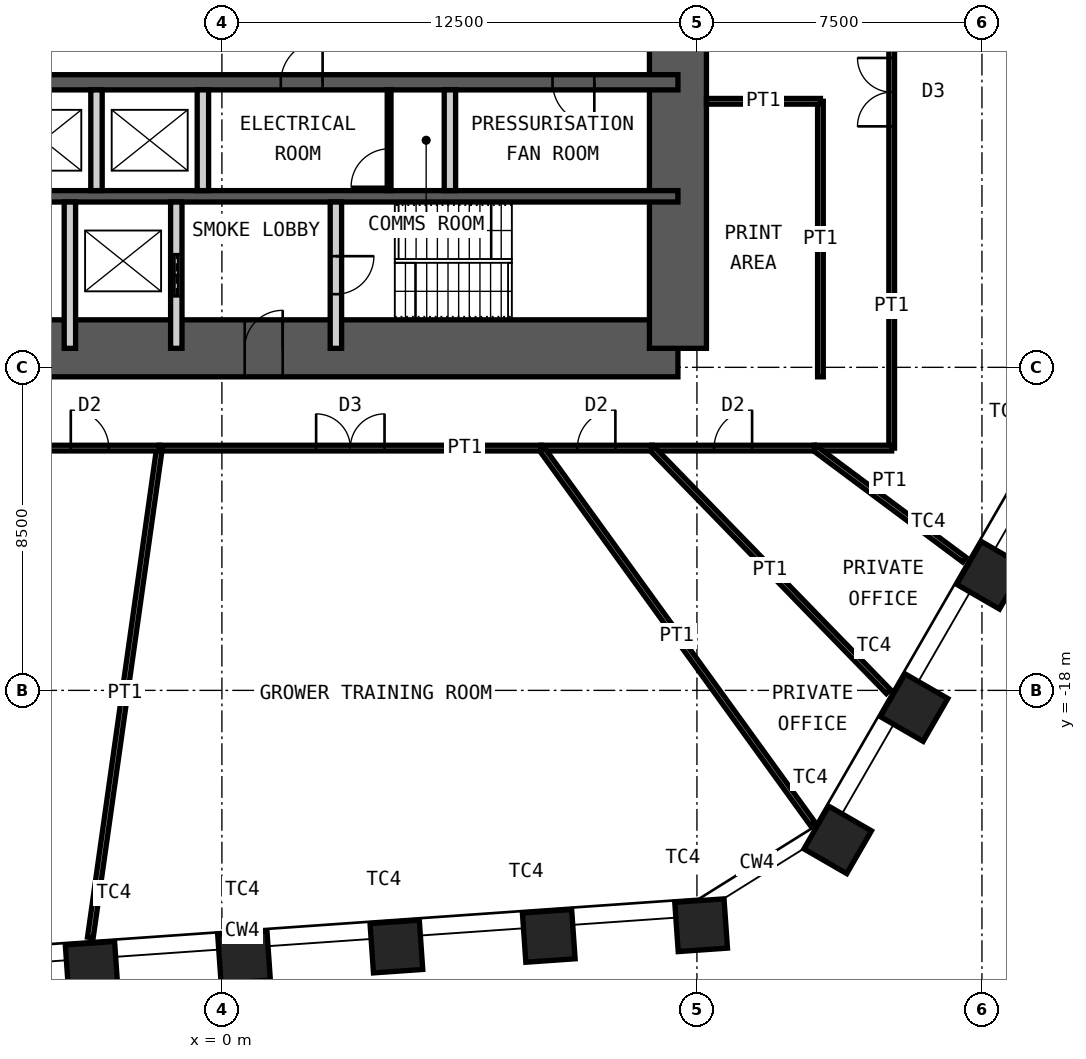
"""IFC4 building model, lengths in metres.
Left out: names, types, materials, properties, quantities, classifications, styles, units other than length and angle.
Written with IfcOpenShell. Run it as: python <this file> out.ifc"""

import sys

from ifc_helpers import new_model, si_unit, direction, frame, frame_2d, origin, origin_2d, place, context, subcontext, project, spatial, rectangle, hollow_rectangle, extrude, element, fill, save


model = new_model("IFC4")
c1 = context("Model", 3, precision=1e-05, world=origin(), true_north=direction((0.0, 1.0)))
c2 = subcontext(c1, "Body", "Model", "MODEL_VIEW")
j1 = project(units=[si_unit("LENGTHUNIT", "METRE"), si_unit("PLANEANGLEUNIT", "RADIAN")], contexts=[c1])
p1 = place(None, origin())
s1 = spatial("IfcSite", under=j1, at=p1, CompositionType="ELEMENT")
p2 = place(p1, origin())
s2 = spatial("IfcBuilding", under=s1, at=p2, CompositionType="ELEMENT")
p3 = place(p2, frame((0.0, 0.0, 166.0)))
s3 = spatial("IfcBuildingStorey", under=s2, at=p3, CompositionType="ELEMENT", Elevation=166.0)
for number, where, z_axis, x_axis in (
    (1, (20.223, -14.972, 0.0), (0.0, 0.0, 1.0), (0.5, 0.866, 0.0)),
    (2, (18.214, -18.453, 0.0), (0.0, 0.0, 1.0), (0.5, 0.866, 0.0)),
    (3, (16.204, -21.933, 0.0), (0.0, 0.0, 1.0), (0.5, 0.866, 0.0)),
    (4, (12.61, -24.179, 0.0), (0.0, 0.0, 1.0), (0.998, 0.07, 0.0)),
    (5, (8.601, -24.46, 0.0), (0.0, 0.0, 1.0), (0.998, 0.07, 0.0)),
    (6, (4.592, -24.74, 0.0), (0.0, 0.0, 1.0), (0.998, 0.07, 0.0)),
    (7, (0.582, -25.02, 0.0), (0.0, 0.0, 1.0), (0.998, 0.07, 0.0)),
    (8, (-3.427, -25.301, 0.0), (0.0, 0.0, 1.0), (0.998, 0.07, 0.0)),
):
    element("IfcColumn", number, at=place(p3, frame(where, z_axis=z_axis, x_axis=x_axis)), inside=s3, PredefinedType="COLUMN", context=c2, shape_type="SweptSolid", body=[
        extrude(hollow_rectangle(XDim=1.3, YDim=1.3, WallThickness=0.1, at=origin_2d()), origin(), (0.0, 0.0, 1.0), 4.2),
    ])
p4 = place(p3, frame((-12.0, -9.0, 0.0), z_axis=(0.0, 0.0, 1.0), x_axis=(1.0, 0.0, 0.0)))
e9 = element("IfcWall", 9, at=p4, inside=s3, PredefinedType="SHEAR", context=c2, shape_type="SweptSolid", body=[
    extrude(rectangle(XDim=24.0, YDim=1.5, at=frame_2d((12.0, 0.0))), origin(), (0.0, 0.0, 1.0), 4.2),
])
p5 = place(p4, frame((1.35, 0.0, 0.0)))
e10 = element("IfcOpeningElement", 10, at=p5, cuts=e9, PredefinedType="OPENING", context=c2, shape_type="SweptSolid", body=[
    extrude(rectangle(XDim=1.0, YDim=2.1, at=frame_2d((0.5, 1.05))), frame((0.0, 0.76, 0.0), z_axis=(0.0, -1.0, 0.0), x_axis=(1.0, 0.0, 0.0)), (0.0, 0.0, 1.0), 1.52),
])
p6 = place(p4, frame((5.325, 0.0, 0.0)))
e11 = element("IfcOpeningElement", 11, at=p6, cuts=e9, PredefinedType="OPENING", context=c2, shape_type="SweptSolid", body=[
    extrude(rectangle(XDim=1.15, YDim=2.1, at=frame_2d((0.575, 1.05))), frame((0.0, 0.76, 0.0), z_axis=(0.0, -1.0, 0.0), x_axis=(1.0, 0.0, 0.0)), (0.0, 0.0, 1.0), 1.52),
])
p7 = place(p4, frame((12.6, 0.0, 0.0)))
e12 = element("IfcOpeningElement", 12, at=p7, cuts=e9, PredefinedType="OPENING", context=c2, shape_type="SweptSolid", body=[
    extrude(rectangle(XDim=1.0, YDim=2.1, at=frame_2d((0.5, 1.05))), frame((0.0, 0.76, 0.0), z_axis=(0.0, -1.0, 0.0), x_axis=(1.0, 0.0, 0.0)), (0.0, 0.0, 1.0), 1.52),
])
p8 = place(p3, frame((12.0, -9.0, 0.0), z_axis=(0.0, 0.0, 1.0), x_axis=(0.0, 1.0, 0.0)))
e13 = element("IfcWall", 13, at=p8, inside=s3, PredefinedType="SHEAR", context=c2, shape_type="SweptSolid", body=[
    extrude(rectangle(XDim=18.0, YDim=1.5, at=frame_2d((9.0, 0.0))), origin(), (0.0, 0.0, 1.0), 4.2),
])
p9 = place(p8, frame((8.1, 0.0, 0.0)))
e14 = element("IfcOpeningElement", 14, at=p9, cuts=e13, PredefinedType="OPENING", context=c2, shape_type="SweptSolid", body=[
    extrude(rectangle(XDim=1.8, YDim=2.1, at=frame_2d((0.9, 1.05))), frame((0.0, 0.76, 0.0), z_axis=(0.0, -1.0, 0.0), x_axis=(1.0, 0.0, 0.0)), (0.0, 0.0, 1.0), 1.52),
])
p10 = place(p3, frame((-12.0, -2.0, 0.0), z_axis=(0.0, 0.0, 1.0), x_axis=(1.0, 0.0, 0.0)))
e15 = element("IfcWall", 15, at=p10, inside=s3, PredefinedType="SHEAR", context=c2, shape_type="SweptSolid", body=[
    extrude(rectangle(XDim=24.0, YDim=0.4, at=frame_2d((12.0, 0.0))), origin(), (0.0, 0.0, 1.0), 4.2),
])
p11 = place(p10, frame((1.1, 0.0, 0.0)))
e16 = element("IfcOpeningElement", 16, at=p11, cuts=e15, PredefinedType="OPENING", context=c2, shape_type="SweptSolid", body=[
    extrude(rectangle(XDim=1.1, YDim=2.1, at=frame_2d((0.55, 1.05))), frame((0.0, 0.21, 0.0), z_axis=(0.0, -1.0, 0.0), x_axis=(1.0, 0.0, 0.0)), (0.0, 0.0, 1.0), 0.42),
])
p12 = place(p10, frame((13.55, 0.0, 0.0)))
e17 = element("IfcOpeningElement", 17, at=p12, cuts=e15, PredefinedType="OPENING", context=c2, shape_type="SweptSolid", body=[
    extrude(rectangle(XDim=1.1, YDim=2.1, at=frame_2d((0.55, 1.05))), frame((0.0, 0.21, 0.0), z_axis=(0.0, -1.0, 0.0), x_axis=(1.0, 0.0, 0.0)), (0.0, 0.0, 1.0), 0.42),
])
p13 = place(p10, frame((20.7, 0.0, 0.0)))
e18 = element("IfcOpeningElement", 18, at=p13, cuts=e15, PredefinedType="OPENING", context=c2, shape_type="SweptSolid", body=[
    extrude(rectangle(XDim=1.1, YDim=2.1, at=frame_2d((0.55, 1.05))), frame((0.0, 0.21, 0.0), z_axis=(0.0, -1.0, 0.0), x_axis=(1.0, 0.0, 0.0)), (0.0, 0.0, 1.0), 0.42),
])
p14 = place(p10, frame((4.0, 0.0, 0.0)))
e19 = element("IfcOpeningElement", 19, at=p14, cuts=e15, PredefinedType="OPENING", context=c2, shape_type="SweptSolid", body=[
    extrude(rectangle(XDim=1.0, YDim=2.1, at=frame_2d((0.5, 1.05))), frame((0.0, 0.21, 0.0), z_axis=(0.0, -1.0, 0.0), x_axis=(1.0, 0.0, 0.0)), (0.0, 0.0, 1.0), 0.42),
])
p15 = place(p3, frame((-12.0, -5.0, 0.0), z_axis=(0.0, 0.0, 1.0), x_axis=(1.0, 0.0, 0.0)))
e20 = element("IfcWall", 20, at=p15, inside=s3, PredefinedType="SHEAR", context=c2, shape_type="SweptSolid", body=[
    extrude(rectangle(XDim=24.0, YDim=0.3, at=frame_2d((12.0, 0.0))), origin(), (0.0, 0.0, 1.0), 4.2),
])
for number, where, z_axis, x_axis in (
    (21, (-3.3, -4.85, 0.0), (0.0, 0.0, 1.0), (0.0, 1.0, 0.0)),
    (22, (-0.5, -4.85, 0.0), (0.0, 0.0, 1.0), (0.0, 1.0, 0.0)),
    (23, (6.0, -4.85, 0.0), (0.0, 0.0, 1.0), (0.0, 1.0, 0.0)),
):
    element("IfcWall", number, at=place(p3, frame(where, z_axis=z_axis, x_axis=x_axis)), inside=s3, PredefinedType="PARTITIONING", context=c2, shape_type="SweptSolid", body=[
        extrude(rectangle(XDim=2.65, YDim=0.3, at=frame_2d((1.325, 0.0))), origin(), (0.0, 0.0, 1.0), 3.98),
    ])
p16 = place(p3, frame((-4.0, -9.0, 0.0), z_axis=(0.0, 0.0, 1.0), x_axis=(0.0, 1.0, 0.0)))
e24 = element("IfcWall", 24, at=p16, inside=s3, PredefinedType="PARTITIONING", context=c2, shape_type="SweptSolid", body=[
    extrude(rectangle(XDim=3.85, YDim=0.3, at=frame_2d((1.925, 0.0))), origin(), (0.0, 0.0, 1.0), 3.98),
])
p17 = place(p3, frame((-1.2, -9.0, 0.0), z_axis=(0.0, 0.0, 1.0), x_axis=(0.0, 1.0, 0.0)))
e25 = element("IfcWall", 25, at=p17, inside=s3, PredefinedType="PARTITIONING", context=c2, shape_type="SweptSolid", body=[
    extrude(rectangle(XDim=3.85, YDim=0.3, at=frame_2d((1.925, 0.0))), origin(), (0.0, 0.0, 1.0), 3.98),
])
p18 = place(p17, frame((1.375, 0.0, 0.0)))
e26 = element("IfcOpeningElement", 26, at=p18, cuts=e25, PredefinedType="OPENING", context=c2, shape_type="SweptSolid", body=[
    extrude(rectangle(XDim=1.1, YDim=2.4, at=frame_2d((0.55, 1.2))), frame((0.0, 0.16, 0.0), z_axis=(0.0, -1.0, 0.0), x_axis=(1.0, 0.0, 0.0)), (0.0, 0.0, 1.0), 0.32),
])
p19 = place(p3, frame((3.0, -9.0, 0.0), z_axis=(0.0, 0.0, 1.0), x_axis=(0.0, 1.0, 0.0)))
e27 = element("IfcWall", 27, at=p19, inside=s3, PredefinedType="PARTITIONING", context=c2, shape_type="SweptSolid", body=[
    extrude(rectangle(XDim=3.85, YDim=0.3, at=frame_2d((1.925, 0.0))), origin(), (0.0, 0.0, 1.0), 3.98),
])
p20 = place(p19, frame((1.425, 0.0, 0.0)))
e28 = element("IfcOpeningElement", 28, at=p20, cuts=e27, PredefinedType="OPENING", context=c2, shape_type="SweptSolid", body=[
    extrude(rectangle(XDim=1.0, YDim=2.1, at=frame_2d((0.5, 1.05))), frame((0.0, 0.16, 0.0), z_axis=(0.0, -1.0, 0.0), x_axis=(1.0, 0.0, 0.0)), (0.0, 0.0, 1.0), 0.32),
])
p21 = place(p3, frame((4.4, -4.85, 0.0), z_axis=(0.0, 0.0, 1.0), x_axis=(0.0, 1.0, 0.0)))
e29 = element("IfcWall", 29, at=p21, inside=s3, PredefinedType="PARTITIONING", context=c2, shape_type="SweptSolid", body=[
    extrude(rectangle(XDim=2.65, YDim=0.1, at=frame_2d((1.325, 0.0))), origin(), (0.0, 0.0, 1.0), 3.98),
])
p22 = place(p21, frame((0.1, 0.0, 0.0)))
e30 = element("IfcOpeningElement", 30, at=p22, cuts=e29, PredefinedType="OPENING", context=c2, shape_type="SweptSolid", body=[
    extrude(rectangle(XDim=1.0, YDim=2.4, at=frame_2d((0.5, 1.2))), frame((0.0, 0.06, 0.0), z_axis=(0.0, -1.0, 0.0), x_axis=(1.0, 0.0, 0.0)), (0.0, 0.0, 1.0), 0.12),
])
p23 = place(p3, frame((17.625, 7.106, 0.0), z_axis=(0.0, 0.0, 1.0), x_axis=(0.0, -1.0, 0.0)))
e31 = element("IfcWall", 31, at=p23, inside=s3, PredefinedType="PARTITIONING", context=c2, shape_type="SweptSolid", body=[
    extrude(rectangle(XDim=18.731, YDim=0.15, at=frame_2d((9.365, 0.0))), origin(), (0.0, 0.0, 1.0), 4.03),
])
p24 = place(p23, frame((8.466, 0.0, 0.0)))
e32 = element("IfcOpeningElement", 32, at=p24, cuts=e31, PredefinedType="OPENING", context=c2, shape_type="SweptSolid", body=[
    extrude(rectangle(XDim=1.8, YDim=2.4, at=frame_2d((0.9, 1.2))), frame((0.0, 0.085, 0.0), z_axis=(0.0, -1.0, 0.0), x_axis=(1.0, 0.0, 0.0)), (0.0, 0.0, 1.0), 0.17),
])
p25 = place(p3, frame((17.625, -11.625, 0.0), z_axis=(0.0, 0.0, 1.0), x_axis=(-1.0, 0.0, 0.0)))
e33 = element("IfcWall", 33, at=p25, inside=s3, PredefinedType="PARTITIONING", context=c2, shape_type="SweptSolid", body=[
    extrude(rectangle(XDim=2.029, YDim=0.15, at=frame_2d((1.014, 0.0))), origin(), (0.0, 0.0, 1.0), 4.03),
])
p26 = place(p3, frame((19.537, -14.562, 0.0), z_axis=(0.0, 0.0, 1.0), x_axis=(-0.801778753003, 0.597620976233, 0.0)))
e34 = element("IfcWall", 34, at=p26, inside=s3, PredefinedType="PARTITIONING", context=c2, shape_type="SweptSolid", body=[
    extrude(rectangle(XDim=4.915, YDim=0.15, at=frame_2d((2.458, 0.0))), origin(), (0.0, 0.0, 1.0), 2.93),
])
p27 = place(p3, frame((15.596, -11.625, 0.0), z_axis=(0.0, 0.0, 1.0), x_axis=(-1.0, 0.0, 0.0)))
e35 = element("IfcWall", 35, at=p27, inside=s3, PredefinedType="PARTITIONING", context=c2, shape_type="SweptSolid", body=[
    extrude(rectangle(XDim=4.289, YDim=0.15, at=frame_2d((2.145, 0.0))), origin(), (0.0, 0.0, 1.0), 4.03),
])
p28 = place(p27, frame((1.645, 0.0, 0.0)))
e36 = element("IfcOpeningElement", 36, at=p28, cuts=e35, PredefinedType="OPENING", context=c2, shape_type="SweptSolid", body=[
    extrude(rectangle(XDim=1.0, YDim=2.4, at=frame_2d((0.5, 1.2))), frame((0.0, 0.085, 0.0), z_axis=(0.0, -1.0, 0.0), x_axis=(1.0, 0.0, 0.0)), (0.0, 0.0, 1.0), 0.17),
])
p29 = place(p3, frame((17.538, -18.031, 0.0), z_axis=(0.0, 0.0, 1.0), x_axis=(-0.697230918085, 0.716846599257, 0.0)))
e37 = element("IfcWall", 37, at=p29, inside=s3, PredefinedType="PARTITIONING", context=c2, shape_type="SweptSolid", body=[
    extrude(rectangle(XDim=8.936, YDim=0.15, at=frame_2d((4.468, 0.0))), origin(), (0.0, 0.0, 1.0), 2.93),
])
p30 = place(p3, frame((11.307, -11.625, 0.0), z_axis=(0.0, 0.0, 1.0), x_axis=(-1.0, 0.0, 0.0)))
e38 = element("IfcWall", 38, at=p30, inside=s3, PredefinedType="PARTITIONING", context=c2, shape_type="SweptSolid", body=[
    extrude(rectangle(XDim=2.906, YDim=0.15, at=frame_2d((1.453, 0.0))), origin(), (0.0, 0.0, 1.0), 4.03),
])
p31 = place(p30, frame((0.953, 0.0, 0.0)))
e39 = element("IfcOpeningElement", 39, at=p31, cuts=e38, PredefinedType="OPENING", context=c2, shape_type="SweptSolid", body=[
    extrude(rectangle(XDim=1.0, YDim=2.4, at=frame_2d((0.5, 1.2))), frame((0.0, 0.085, 0.0), z_axis=(0.0, -1.0, 0.0), x_axis=(1.0, 0.0, 0.0)), (0.0, 0.0, 1.0), 0.17),
])
p32 = place(p3, frame((15.54, -21.502, 0.0), z_axis=(0.0, 0.0, 1.0), x_axis=(-0.585731902034, 0.810504866697, 0.0)))
e40 = element("IfcWall", 40, at=p32, inside=s3, PredefinedType="PARTITIONING", context=c2, shape_type="SweptSolid", body=[
    extrude(rectangle(XDim=12.187, YDim=0.15, at=frame_2d((6.093, 0.0))), origin(), (0.0, 0.0, 1.0), 3.03),
])
p33 = place(p3, frame((8.401, -11.625, 0.0), z_axis=(0.0, 0.0, 1.0), x_axis=(-1.0, 0.0, 0.0)))
e41 = element("IfcWall", 41, at=p33, inside=s3, PredefinedType="PARTITIONING", context=c2, shape_type="SweptSolid", body=[
    extrude(rectangle(XDim=10.044, YDim=0.15, at=frame_2d((5.022, 0.0))), origin(), (0.0, 0.0, 1.0), 4.03),
])
p34 = place(p33, frame((4.122, 0.0, 0.0)))
e42 = element("IfcOpeningElement", 42, at=p34, cuts=e41, PredefinedType="OPENING", context=c2, shape_type="SweptSolid", body=[
    extrude(rectangle(XDim=1.8, YDim=2.4, at=frame_2d((0.9, 1.2))), frame((0.0, 0.085, 0.0), z_axis=(0.0, -1.0, 0.0), x_axis=(1.0, 0.0, 0.0)), (0.0, 0.0, 1.0), 0.17),
])
p35 = place(p3, frame((-3.462, -24.503, 0.0), z_axis=(0.0, 0.0, 1.0), x_axis=(0.139899618934, 0.990165691499, 0.0)))
e43 = element("IfcWall", 43, at=p35, inside=s3, PredefinedType="PARTITIONING", context=c2, shape_type="SweptSolid", body=[
    extrude(rectangle(XDim=13.006, YDim=0.15, at=frame_2d((6.503, 0.0))), origin(), (0.0, 0.0, 1.0), 2.93),
])
p36 = place(p3, frame((-1.642, -11.625, 0.0), z_axis=(0.0, 0.0, 1.0), x_axis=(-1.0, 0.0, 0.0)))
e44 = element("IfcWall", 44, at=p36, inside=s3, PredefinedType="PARTITIONING", context=c2, shape_type="SweptSolid", body=[
    extrude(rectangle(XDim=3.668, YDim=0.15, at=frame_2d((1.834, 0.0))), origin(), (0.0, 0.0, 1.0), 4.03),
])
p37 = place(p36, frame((1.334, 0.0, 0.0)))
e45 = element("IfcOpeningElement", 45, at=p37, cuts=e44, PredefinedType="OPENING", context=c2, shape_type="SweptSolid", body=[
    extrude(rectangle(XDim=1.0, YDim=2.4, at=frame_2d((0.5, 1.2))), frame((0.0, 0.085, 0.0), z_axis=(0.0, -1.0, 0.0), x_axis=(1.0, 0.0, 0.0)), (0.0, 0.0, 1.0), 0.17),
])
p38 = place(p3, frame((15.75, -9.75, 0.0), z_axis=(0.0, 0.0, 1.0), x_axis=(0.0, 1.0, 0.0)))
e46 = element("IfcWall", 46, at=p38, inside=s3, PredefinedType="PARTITIONING", context=c2, shape_type="SweptSolid", body=[
    extrude(rectangle(XDim=7.25, YDim=0.15, at=frame_2d((3.625, 0.0))), origin(), (0.0, 0.0, 1.0), 4.03),
])
p39 = place(p3, frame((12.75, -2.5, 0.0), z_axis=(0.0, 0.0, 1.0), x_axis=(1.0, 0.0, 0.0)))
e47 = element("IfcWall", 47, at=p39, inside=s3, PredefinedType="PARTITIONING", context=c2, shape_type="SweptSolid", body=[
    extrude(rectangle(XDim=3.0, YDim=0.15, at=frame_2d((1.5, 0.0))), origin(), (0.0, 0.0, 1.0), 2.93),
])
p40 = place(p7, origin())
e48 = element("IfcDoor", 48, at=p40, inside=s3, OperationType="SINGLE_SWING_LEFT", PredefinedType="DOOR", context=c2, shape_type="SweptSolid", body=[
    extrude(rectangle(XDim=1.0, YDim=2.1, at=frame_2d((0.5, 1.05))), frame((0.0, 0.025, 0.0), z_axis=(0.0, -1.0, 0.0), x_axis=(1.0, 0.0, 0.0)), (0.0, 0.0, 1.0), 0.05),
])
fill(e12, e48)
p41 = place(p20, origin())
e49 = element("IfcDoor", 49, at=p41, inside=s3, OperationType="SINGLE_SWING_RIGHT", PredefinedType="DOOR", context=c2, shape_type="SweptSolid", body=[
    extrude(rectangle(XDim=1.0, YDim=2.1, at=frame_2d((0.5, 1.05))), frame((0.0, 0.025, 0.0), z_axis=(0.0, -1.0, 0.0), x_axis=(1.0, 0.0, 0.0)), (0.0, 0.0, 1.0), 0.05),
])
fill(e28, e49)
p42 = place(p12, origin())
e50 = element("IfcDoor", 50, at=p42, inside=s3, OperationType="SINGLE_SWING_LEFT", PredefinedType="DOOR", context=c2, shape_type="SweptSolid", body=[
    extrude(rectangle(XDim=1.1, YDim=2.1, at=frame_2d((0.55, 1.05))), frame((0.0, 0.025, 0.0), z_axis=(0.0, -1.0, 0.0), x_axis=(1.0, 0.0, 0.0)), (0.0, 0.0, 1.0), 0.05),
])
fill(e17, e50)
p43 = place(p13, origin())
e51 = element("IfcDoor", 51, at=p43, inside=s3, OperationType="SINGLE_SWING_RIGHT", PredefinedType="DOOR", context=c2, shape_type="SweptSolid", body=[
    extrude(rectangle(XDim=1.1, YDim=2.1, at=frame_2d((0.55, 1.05))), frame((0.0, 0.025, 0.0), z_axis=(0.0, -1.0, 0.0), x_axis=(1.0, 0.0, 0.0)), (0.0, 0.0, 1.0), 0.05),
])
fill(e18, e51)
p44 = place(p18, origin())
e52 = element("IfcDoor", 52, at=p44, inside=s3, OperationType="DOUBLE_DOOR_SLIDING", PredefinedType="DOOR", context=c2, shape_type="SweptSolid", body=[
    extrude(rectangle(XDim=1.1, YDim=2.4, at=frame_2d((0.55, 1.2))), frame((0.0, 0.025, 0.0), z_axis=(0.0, -1.0, 0.0), x_axis=(1.0, 0.0, 0.0)), (0.0, 0.0, 1.0), 0.05),
])
fill(e26, e52)
p45 = place(p22, origin())
e53 = element("IfcDoor", 53, at=p45, inside=s3, OperationType="SINGLE_SWING_RIGHT", PredefinedType="DOOR", context=c2, shape_type="SweptSolid", body=[
    extrude(rectangle(XDim=1.0, YDim=2.4, at=frame_2d((0.5, 1.2))), frame((0.0, 0.025, 0.0), z_axis=(0.0, -1.0, 0.0), x_axis=(1.0, 0.0, 0.0)), (0.0, 0.0, 1.0), 0.05),
])
fill(e30, e53)
p46 = place(p24, origin())
e54 = element("IfcDoor", 54, at=p46, inside=s3, OperationType="DOUBLE_DOOR_DOUBLE_SWING", PredefinedType="DOOR", context=c2, shape_type="SweptSolid", body=[
    extrude(rectangle(XDim=1.8, YDim=2.4, at=frame_2d((0.9, 1.2))), frame((0.0, 0.025, 0.0), z_axis=(0.0, -1.0, 0.0), x_axis=(1.0, 0.0, 0.0)), (0.0, 0.0, 1.0), 0.05),
])
fill(e32, e54)
p47 = place(p28, origin())
e55 = element("IfcDoor", 55, at=p47, inside=s3, OperationType="SINGLE_SWING_LEFT", PredefinedType="DOOR", context=c2, shape_type="SweptSolid", body=[
    extrude(rectangle(XDim=1.0, YDim=2.4, at=frame_2d((0.5, 1.2))), frame((0.0, 0.025, 0.0), z_axis=(0.0, -1.0, 0.0), x_axis=(1.0, 0.0, 0.0)), (0.0, 0.0, 1.0), 0.05),
])
fill(e36, e55)
p48 = place(p31, origin())
e56 = element("IfcDoor", 56, at=p48, inside=s3, OperationType="SINGLE_SWING_LEFT", PredefinedType="DOOR", context=c2, shape_type="SweptSolid", body=[
    extrude(rectangle(XDim=1.0, YDim=2.4, at=frame_2d((0.5, 1.2))), frame((0.0, 0.025, 0.0), z_axis=(0.0, -1.0, 0.0), x_axis=(1.0, 0.0, 0.0)), (0.0, 0.0, 1.0), 0.05),
])
fill(e39, e56)
p49 = place(p34, origin())
e57 = element("IfcDoor", 57, at=p49, inside=s3, OperationType="DOUBLE_DOOR_DOUBLE_SWING", PredefinedType="DOOR", context=c2, shape_type="SweptSolid", body=[
    extrude(rectangle(XDim=1.8, YDim=2.4, at=frame_2d((0.9, 1.2))), frame((0.0, 0.025, 0.0), z_axis=(0.0, -1.0, 0.0), x_axis=(1.0, 0.0, 0.0)), (0.0, 0.0, 1.0), 0.05),
])
fill(e42, e57)
p50 = place(p37, origin())
e58 = element("IfcDoor", 58, at=p50, inside=s3, OperationType="SINGLE_SWING_RIGHT", PredefinedType="DOOR", context=c2, shape_type="SweptSolid", body=[
    extrude(rectangle(XDim=1.0, YDim=2.4, at=frame_2d((0.5, 1.2))), frame((0.0, 0.025, 0.0), z_axis=(0.0, -1.0, 0.0), x_axis=(1.0, 0.0, 0.0)), (0.0, 0.0, 1.0), 0.05),
])
fill(e45, e58)
save(model, sys.argv[1])
